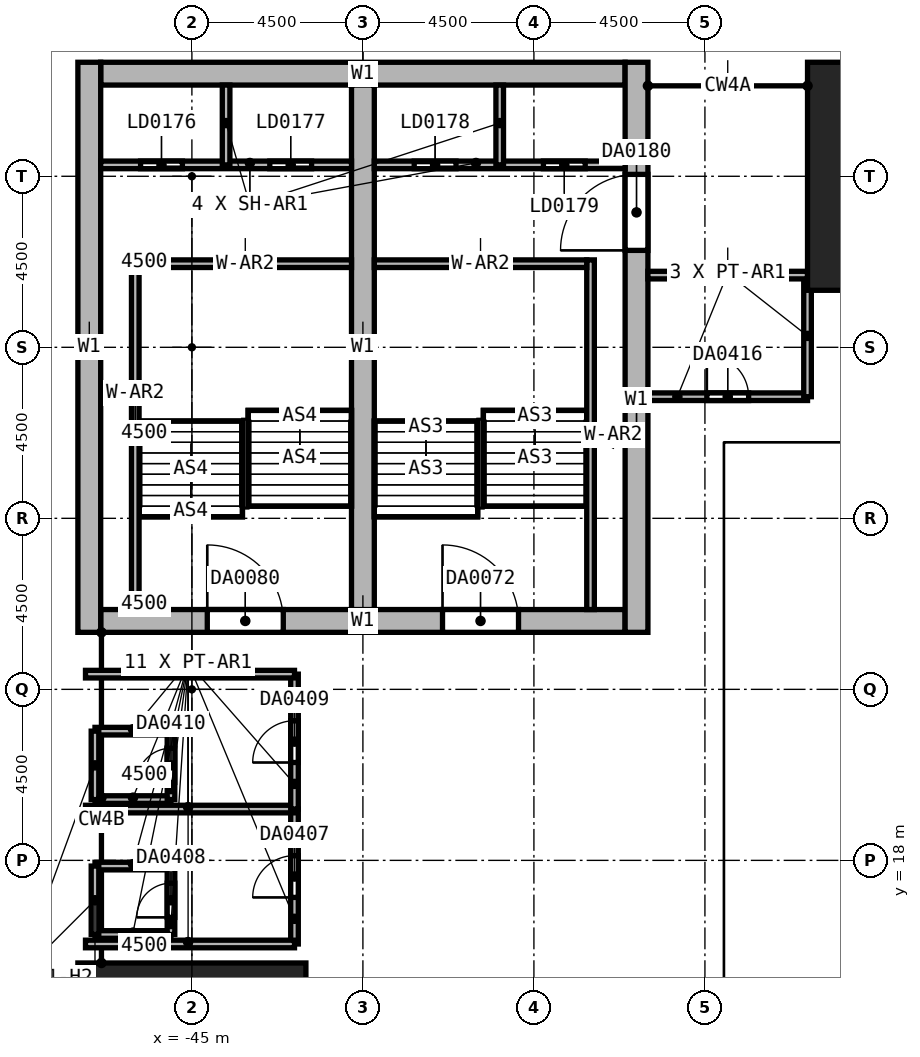
"""IFC4 building model, lengths in metres.
Left out: names, types, materials, properties, quantities, classifications, styles, units other than length and angle.
Written with IfcOpenShell. Run it as: python <this file> out.ifc"""

import sys

from ifc_helpers import new_model, si_unit, direction, frame, frame_2d, origin, origin_2d, place, context, subcontext, project, spatial, rectangle, extrude, element, fill, save


model = new_model("IFC4")
c1 = context("Model", 3, precision=1e-05, world=origin(), true_north=direction((0.0, 1.0)))
c2 = subcontext(c1, "Body", "Model", "MODEL_VIEW")
j1 = project(units=[si_unit("LENGTHUNIT", "METRE"), si_unit("PLANEANGLEUNIT", "RADIAN")], contexts=[c1])
p1 = place(None, origin())
s1 = spatial("IfcSite", under=j1, at=p1, CompositionType="ELEMENT")
p2 = place(p1, origin())
s2 = spatial("IfcBuilding", under=s1, at=p2, CompositionType="ELEMENT")
p3 = place(p2, frame((0.0, 0.0, 25.0)))
s3 = spatial("IfcBuildingStorey", under=s2, at=p3, CompositionType="ELEMENT", Elevation=25.0)
for number, where, z_axis, x_axis in (
    (1, (-27.0, 36.0, 0.0), (0.0, 0.0, 1.0), (1.0, 0.0, 0.0)),
    (2, (-45.0, 13.5, 0.0), (0.0, 0.0, 1.0), (0.0, 1.0, 0.0)),
):
    element("IfcColumn", number, at=place(p3, frame(where, z_axis=z_axis, x_axis=x_axis)), inside=s3, PredefinedType="COLUMN", context=c2, shape_type="SweptSolid", body=[
        extrude(rectangle(XDim=3.6, YDim=6.0, at=origin_2d()), origin(), (0.0, 0.0, 1.0), 6.0),
    ])
p4 = place(p3, frame((-47.4, 38.7, 0.0), z_axis=(0.0, 0.0, 1.0), x_axis=(1.0, 0.0, 0.0)))
e3 = element("IfcWall", 3, at=p4, inside=s3, PredefinedType="SHEAR", context=c2, shape_type="SweptSolid", body=[
    extrude(rectangle(XDim=13.8, YDim=0.6, at=frame_2d((6.9, 0.0))), origin(), (0.0, 0.0, 1.0), 6.0),
])
p5 = place(p3, frame((-47.4, 24.3, 0.0), z_axis=(0.0, 0.0, 1.0), x_axis=(1.0, 0.0, 0.0)))
e4 = element("IfcWall", 4, at=p5, inside=s3, PredefinedType="SHEAR", context=c2, shape_type="SweptSolid", body=[
    extrude(rectangle(XDim=13.8, YDim=0.6, at=frame_2d((6.9, 0.0))), origin(), (0.0, 0.0, 1.0), 6.0),
])
p6 = place(p5, frame((8.995, 0.0, 0.0)))
e5 = element("IfcOpeningElement", 5, at=p6, cuts=e4, PredefinedType="OPENING", context=c2, shape_type="SweptSolid", body=[
    extrude(rectangle(XDim=2.0, YDim=2.4, at=frame_2d((1.0, 1.2))), frame((0.0, 0.3, 0.0), z_axis=(0.0, -1.0, 0.0), x_axis=(1.0, 0.0, 0.0)), (0.0, 0.0, 1.0), 0.6),
])
p7 = place(p5, frame((2.805, 0.0, 0.0)))
e6 = element("IfcOpeningElement", 6, at=p7, cuts=e4, PredefinedType="OPENING", context=c2, shape_type="SweptSolid", body=[
    extrude(rectangle(XDim=2.0, YDim=2.4, at=frame_2d((1.0, 1.2))), frame((0.0, 0.3, 0.0), z_axis=(0.0, -1.0, 0.0), x_axis=(1.0, 0.0, 0.0)), (0.0, 0.0, 1.0), 0.6),
])
p8 = place(p3, frame((-47.7, 24.0, 0.0), z_axis=(0.0, 0.0, 1.0), x_axis=(0.0, 1.0, 0.0)))
e7 = element("IfcWall", 7, at=p8, inside=s3, PredefinedType="SHEAR", context=c2, shape_type="SweptSolid", body=[
    extrude(rectangle(XDim=15.0, YDim=0.6, at=frame_2d((7.5, 0.0))), origin(), (0.0, 0.0, 1.0), 6.0),
])
p9 = place(p3, frame((-33.3, 24.0, 0.0), z_axis=(0.0, 0.0, 1.0), x_axis=(0.0, 1.0, 0.0)))
e8 = element("IfcWall", 8, at=p9, inside=s3, PredefinedType="SHEAR", context=c2, shape_type="SweptSolid", body=[
    extrude(rectangle(XDim=15.0, YDim=0.6, at=frame_2d((7.5, 0.0))), origin(), (0.0, 0.0, 1.0), 6.0),
])
p10 = place(p9, frame((10.05, 0.0, 0.0)))
e9 = element("IfcOpeningElement", 9, at=p10, cuts=e8, PredefinedType="OPENING", context=c2, shape_type="SweptSolid", body=[
    extrude(rectangle(XDim=2.0, YDim=2.4, at=frame_2d((1.0, 1.2))), frame((0.0, 0.3, 0.0), z_axis=(0.0, -1.0, 0.0), x_axis=(1.0, 0.0, 0.0)), (0.0, 0.0, 1.0), 0.6),
])
p11 = place(p3, frame((-40.5, 24.6, 0.0), z_axis=(0.0, 0.0, 1.0), x_axis=(0.0, 1.0, 0.0)))
e10 = element("IfcWall", 10, at=p11, inside=s3, PredefinedType="SHEAR", context=c2, shape_type="SweptSolid", body=[
    extrude(rectangle(XDim=13.8, YDim=0.6, at=frame_2d((6.9, 0.0))), origin(), (0.0, 0.0, 1.0), 6.0),
])
p12 = place(p3, frame((-34.51, 24.6, 0.0), z_axis=(0.0, 0.0, 1.0), x_axis=(0.0, 1.0, 0.0)))
e11 = element("IfcWall", 11, at=p12, inside=s3, PredefinedType="SOLIDWALL", context=c2, shape_type="SweptSolid", body=[
    extrude(rectangle(XDim=9.2, YDim=0.2, at=frame_2d((4.6, 0.0))), origin(), (0.0, 0.0, 1.0), 6.0),
])
p13 = place(p3, frame((-40.2, 33.7, 0.0), z_axis=(0.0, 0.0, 1.0), x_axis=(1.0, 0.0, 0.0)))
e12 = element("IfcWall", 12, at=p13, inside=s3, PredefinedType="SOLIDWALL", context=c2, shape_type="SweptSolid", body=[
    extrude(rectangle(XDim=5.59, YDim=0.2, at=frame_2d((2.795, 0.0))), origin(), (0.0, 0.0, 1.0), 6.0),
])
p14 = place(p3, frame((-46.49, 24.6, 0.0), z_axis=(0.0, 0.0, 1.0), x_axis=(0.0, 1.0, 0.0)))
e13 = element("IfcWall", 13, at=p14, inside=s3, PredefinedType="SOLIDWALL", context=c2, shape_type="SweptSolid", body=[
    extrude(rectangle(XDim=9.2, YDim=0.2, at=frame_2d((4.6, 0.0))), origin(), (0.0, 0.0, 1.0), 6.0),
])
p15 = place(p3, frame((-46.39, 33.7, 0.0), z_axis=(0.0, 0.0, 1.0), x_axis=(1.0, 0.0, 0.0)))
e14 = element("IfcWall", 14, at=p15, inside=s3, PredefinedType="SOLIDWALL", context=c2, shape_type="SweptSolid", body=[
    extrude(rectangle(XDim=5.59, YDim=0.2, at=frame_2d((2.795, 0.0))), origin(), (0.0, 0.0, 1.0), 6.0),
])
p16 = place(p3, frame((-47.4, 36.3, 0.0), z_axis=(0.0, 0.0, 1.0), x_axis=(1.0, 0.0, 0.0)))
e15 = element("IfcWall", 15, at=p16, inside=s3, PredefinedType="SHEAR", context=c2, shape_type="SweptSolid", body=[
    extrude(rectangle(XDim=6.6, YDim=0.2, at=frame_2d((3.3, 0.0))), origin(), (0.0, 0.0, 1.0), 6.0),
])
p17 = place(p16, frame((1.05, 0.0, 0.0)))
e16 = element("IfcOpeningElement", 16, at=p17, cuts=e15, PredefinedType="OPENING", context=c2, shape_type="SweptSolid", body=[
    extrude(rectangle(XDim=1.1, YDim=2.4, at=frame_2d((0.55, 1.2))), frame((0.0, 0.1, 0.0), z_axis=(0.0, -1.0, 0.0), x_axis=(1.0, 0.0, 0.0)), (0.0, 0.0, 1.0), 0.2),
])
p18 = place(p16, frame((4.45, 0.0, 0.0)))
e17 = element("IfcOpeningElement", 17, at=p18, cuts=e15, PredefinedType="OPENING", context=c2, shape_type="SweptSolid", body=[
    extrude(rectangle(XDim=1.1, YDim=2.4, at=frame_2d((0.55, 1.2))), frame((0.0, 0.1, 0.0), z_axis=(0.0, -1.0, 0.0), x_axis=(1.0, 0.0, 0.0)), (0.0, 0.0, 1.0), 0.2),
])
p19 = place(p3, frame((-40.2, 36.3, 0.0), z_axis=(0.0, 0.0, 1.0), x_axis=(1.0, 0.0, 0.0)))
e18 = element("IfcWall", 18, at=p19, inside=s3, PredefinedType="SHEAR", context=c2, shape_type="SweptSolid", body=[
    extrude(rectangle(XDim=6.6, YDim=0.2, at=frame_2d((3.3, 0.0))), origin(), (0.0, 0.0, 1.0), 6.0),
])
p20 = place(p19, frame((1.05, 0.0, 0.0)))
e19 = element("IfcOpeningElement", 19, at=p20, cuts=e18, PredefinedType="OPENING", context=c2, shape_type="SweptSolid", body=[
    extrude(rectangle(XDim=1.1, YDim=2.4, at=frame_2d((0.55, 1.2))), frame((0.0, 0.1, 0.0), z_axis=(0.0, -1.0, 0.0), x_axis=(1.0, 0.0, 0.0)), (0.0, 0.0, 1.0), 0.2),
])
p21 = place(p19, frame((4.45, 0.0, 0.0)))
e20 = element("IfcOpeningElement", 20, at=p21, cuts=e18, PredefinedType="OPENING", context=c2, shape_type="SweptSolid", body=[
    extrude(rectangle(XDim=1.1, YDim=2.4, at=frame_2d((0.55, 1.2))), frame((0.0, 0.1, 0.0), z_axis=(0.0, -1.0, 0.0), x_axis=(1.0, 0.0, 0.0)), (0.0, 0.0, 1.0), 0.2),
])
for number, where, z_axis, x_axis in (
    (21, (-36.9, 36.3, 0.0), (0.0, 0.0, 1.0), (0.0, 1.0, 0.0)),
    (22, (-44.1, 36.3, 0.0), (0.0, 0.0, 1.0), (0.0, 1.0, 0.0)),
):
    element("IfcWall", number, at=place(p3, frame(where, z_axis=z_axis, x_axis=x_axis)), inside=s3, PredefinedType="SHEAR", context=c2, shape_type="SweptSolid", body=[
        extrude(rectangle(XDim=2.1, YDim=0.2, at=frame_2d((1.05, 0.0))), origin(), (0.0, 0.0, 1.0), 6.0),
    ])
p22 = place(p3, frame((-42.3, 15.8, 0.0), z_axis=(0.0, 0.0, 1.0), x_axis=(0.0, 1.0, 0.0)))
e23 = element("IfcWall", 23, at=p22, inside=s3, PredefinedType="PARTITIONING", context=c2, shape_type="SweptSolid", body=[
    extrude(rectangle(XDim=3.55, YDim=0.2, at=frame_2d((1.775, 0.0))), origin(), (0.0, 0.0, 1.0), 5.7),
])
p23 = place(p22, frame((1.225, 0.0, 0.0)))
e24 = element("IfcOpeningElement", 24, at=p23, cuts=e23, PredefinedType="OPENING", context=c2, shape_type="SweptSolid", body=[
    extrude(rectangle(XDim=1.1, YDim=2.4, at=frame_2d((0.55, 1.2))), frame((0.0, 0.1, 0.0), z_axis=(0.0, -1.0, 0.0), x_axis=(1.0, 0.0, 0.0)), (0.0, 0.0, 1.0), 0.2),
])
for number, where, z_axis, x_axis in (
    (25, (-42.3, 15.8, 0.0), (0.0, 0.0, 1.0), (-1.0, 0.0, 0.0)),
    (26, (-47.8, 19.35, 0.0), (0.0, 0.0, 1.0), (1.0, 0.0, 0.0)),
):
    element("IfcWall", number, at=place(p3, frame(where, z_axis=z_axis, x_axis=x_axis)), inside=s3, PredefinedType="PARTITIONING", context=c2, shape_type="SweptSolid", body=[
        extrude(rectangle(XDim=5.5, YDim=0.2, at=frame_2d((2.75, 0.0))), origin(), (0.0, 0.0, 1.0), 5.7),
    ])
for number, where, z_axis, x_axis in (
    (27, (-47.55, 16.05, 0.0), (0.0, 0.0, 1.0), (1.0, 0.0, 0.0)),
    (28, (-45.55, 17.85, 0.0), (0.0, 0.0, 1.0), (-1.0, 0.0, 0.0)),
):
    element("IfcWall", number, at=place(p3, frame(where, z_axis=z_axis, x_axis=x_axis)), inside=s3, PredefinedType="PARTITIONING", context=c2, shape_type="SweptSolid", body=[
        extrude(rectangle(XDim=2.0, YDim=0.2, at=frame_2d((1.0, 0.0))), origin(), (0.0, 0.0, 1.0), 5.7),
    ])
p24 = place(p3, frame((-47.55, 16.05, 0.0), z_axis=(0.0, 0.0, 1.0), x_axis=(0.0, 1.0, 0.0)))
e29 = element("IfcWall", 29, at=p24, inside=s3, PredefinedType="PARTITIONING", context=c2, shape_type="SweptSolid", body=[
    extrude(rectangle(XDim=1.8, YDim=0.2, at=frame_2d((0.9, 0.0))), origin(), (0.0, 0.0, 1.0), 4.5),
])
p25 = place(p3, frame((-45.55, 16.05, 0.0), z_axis=(0.0, 0.0, 1.0), x_axis=(0.0, 1.0, 0.0)))
e30 = element("IfcWall", 30, at=p25, inside=s3, PredefinedType="PARTITIONING", context=c2, shape_type="SweptSolid", body=[
    extrude(rectangle(XDim=1.8, YDim=0.2, at=frame_2d((0.9, 0.0))), origin(), (0.0, 0.0, 1.0), 5.7),
])
p26 = place(p25, frame((0.45, 0.0, 0.0)))
e31 = element("IfcOpeningElement", 31, at=p26, cuts=e30, PredefinedType="OPENING", context=c2, shape_type="SweptSolid", body=[
    extrude(rectangle(XDim=0.9, YDim=2.1, at=frame_2d((0.45, 1.05))), frame((0.0, 0.1, 0.0), z_axis=(0.0, -1.0, 0.0), x_axis=(1.0, 0.0, 0.0)), (0.0, 0.0, 1.0), 0.2),
])
p27 = place(p3, frame((-42.3, 19.35, 0.0), z_axis=(0.0, 0.0, 1.0), x_axis=(0.0, 1.0, 0.0)))
e32 = element("IfcWall", 32, at=p27, inside=s3, PredefinedType="PARTITIONING", context=c2, shape_type="SweptSolid", body=[
    extrude(rectangle(XDim=3.55, YDim=0.2, at=frame_2d((1.775, 0.0))), origin(), (0.0, 0.0, 1.0), 5.7),
])
p28 = place(p27, frame((1.225, 0.0, 0.0)))
e33 = element("IfcOpeningElement", 33, at=p28, cuts=e32, PredefinedType="OPENING", context=c2, shape_type="SweptSolid", body=[
    extrude(rectangle(XDim=1.1, YDim=2.4, at=frame_2d((0.55, 1.2))), frame((0.0, 0.1, 0.0), z_axis=(0.0, -1.0, 0.0), x_axis=(1.0, 0.0, 0.0)), (0.0, 0.0, 1.0), 0.2),
])
p29 = place(p3, frame((-42.3, 22.9, 0.0), z_axis=(0.0, 0.0, 1.0), x_axis=(-1.0, 0.0, 0.0)))
e34 = element("IfcWall", 34, at=p29, inside=s3, PredefinedType="PARTITIONING", context=c2, shape_type="SweptSolid", body=[
    extrude(rectangle(XDim=5.5, YDim=0.2, at=frame_2d((2.75, 0.0))), origin(), (0.0, 0.0, 1.0), 5.7),
])
for number, where, z_axis, x_axis in (
    (35, (-47.55, 19.6, 0.0), (0.0, 0.0, 1.0), (1.0, 0.0, 0.0)),
    (36, (-45.55, 21.4, 0.0), (0.0, 0.0, 1.0), (-1.0, 0.0, 0.0)),
):
    element("IfcWall", number, at=place(p3, frame(where, z_axis=z_axis, x_axis=x_axis)), inside=s3, PredefinedType="PARTITIONING", context=c2, shape_type="SweptSolid", body=[
        extrude(rectangle(XDim=2.0, YDim=0.2, at=frame_2d((1.0, 0.0))), origin(), (0.0, 0.0, 1.0), 5.7),
    ])
p30 = place(p3, frame((-47.55, 19.6, 0.0), z_axis=(0.0, 0.0, 1.0), x_axis=(0.0, 1.0, 0.0)))
e37 = element("IfcWall", 37, at=p30, inside=s3, PredefinedType="PARTITIONING", context=c2, shape_type="SweptSolid", body=[
    extrude(rectangle(XDim=1.8, YDim=0.2, at=frame_2d((0.9, 0.0))), origin(), (0.0, 0.0, 1.0), 4.5),
])
p31 = place(p3, frame((-45.55, 19.6, 0.0), z_axis=(0.0, 0.0, 1.0), x_axis=(0.0, 1.0, 0.0)))
e38 = element("IfcWall", 38, at=p31, inside=s3, PredefinedType="PARTITIONING", context=c2, shape_type="SweptSolid", body=[
    extrude(rectangle(XDim=1.8, YDim=0.2, at=frame_2d((0.9, 0.0))), origin(), (0.0, 0.0, 1.0), 5.7),
])
p32 = place(p31, frame((0.45, 0.0, 0.0)))
e39 = element("IfcOpeningElement", 39, at=p32, cuts=e38, PredefinedType="OPENING", context=c2, shape_type="SweptSolid", body=[
    extrude(rectangle(XDim=0.9, YDim=2.1, at=frame_2d((0.45, 1.05))), frame((0.0, 0.1, 0.0), z_axis=(0.0, -1.0, 0.0), x_axis=(1.0, 0.0, 0.0)), (0.0, 0.0, 1.0), 0.2),
])
p33 = place(p3, frame((-33.0, 30.2, 0.0), z_axis=(0.0, 0.0, 1.0), x_axis=(1.0, 0.0, 0.0)))
e40 = element("IfcWall", 40, at=p33, inside=s3, PredefinedType="PARTITIONING", context=c2, shape_type="SweptSolid", body=[
    extrude(rectangle(XDim=4.2, YDim=0.2, at=frame_2d((2.1, 0.0))), origin(), (0.0, 0.0, 1.0), 5.7),
])
p34 = place(p33, frame((1.55, 0.0, 0.0)))
e41 = element("IfcOpeningElement", 41, at=p34, cuts=e40, PredefinedType="OPENING", context=c2, shape_type="SweptSolid", body=[
    extrude(rectangle(XDim=1.1, YDim=2.4, at=frame_2d((0.55, 1.2))), frame((0.0, 0.1, 0.0), z_axis=(0.0, -1.0, 0.0), x_axis=(1.0, 0.0, 0.0)), (0.0, 0.0, 1.0), 0.2),
])
p35 = place(p3, frame((-28.8, 30.2, 0.0), z_axis=(0.0, 0.0, 1.0), x_axis=(0.0, 1.0, 0.0)))
e42 = element("IfcWall", 42, at=p35, inside=s3, PredefinedType="PARTITIONING", context=c2, shape_type="SweptSolid", body=[
    extrude(rectangle(XDim=3.2, YDim=0.2, at=frame_2d((1.6, 0.0))), origin(), (0.0, 0.0, 1.0), 5.7),
])
p36 = place(p3, frame((-33.0, 33.4, 0.0), z_axis=(0.0, 0.0, 1.0), x_axis=(1.0, 0.0, 0.0)))
e43 = element("IfcWall", 43, at=p36, inside=s3, PredefinedType="PARTITIONING", context=c2, shape_type="SweptSolid", body=[
    extrude(rectangle(XDim=4.2, YDim=0.2, at=frame_2d((2.1, 0.0))), origin(), (0.0, 0.0, 1.0), 5.7),
])
p37 = place(p6, origin())
e44 = element("IfcDoor", 44, at=p37, inside=s3, OperationType="DOUBLE_DOOR_SINGLE_SWING", PredefinedType="DOOR", context=c2, shape_type="SweptSolid", body=[
    extrude(rectangle(XDim=2.0, YDim=2.4, at=frame_2d((1.0, 1.2))), frame((0.0, 0.025, 0.0), z_axis=(0.0, -1.0, 0.0), x_axis=(1.0, 0.0, 0.0)), (0.0, 0.0, 1.0), 0.05),
])
fill(e5, e44)
p38 = place(p7, origin())
e45 = element("IfcDoor", 45, at=p38, inside=s3, OperationType="DOUBLE_DOOR_SINGLE_SWING", PredefinedType="DOOR", context=c2, shape_type="SweptSolid", body=[
    extrude(rectangle(XDim=2.0, YDim=2.4, at=frame_2d((1.0, 1.2))), frame((0.0, 0.025, 0.0), z_axis=(0.0, -1.0, 0.0), x_axis=(1.0, 0.0, 0.0)), (0.0, 0.0, 1.0), 0.05),
])
fill(e6, e45)
p39 = place(p17, origin())
e46 = element("IfcDoor", 46, at=p39, inside=s3, OperationType="DOUBLE_DOOR_SLIDING", PredefinedType="DOOR", context=c2, shape_type="SweptSolid", body=[
    extrude(rectangle(XDim=1.1, YDim=2.4, at=frame_2d((0.55, 1.2))), frame((0.0, 0.025, 0.0), z_axis=(0.0, -1.0, 0.0), x_axis=(1.0, 0.0, 0.0)), (0.0, 0.0, 1.0), 0.05),
])
fill(e16, e46)
p40 = place(p18, origin())
e47 = element("IfcDoor", 47, at=p40, inside=s3, OperationType="DOUBLE_DOOR_SLIDING", PredefinedType="DOOR", context=c2, shape_type="SweptSolid", body=[
    extrude(rectangle(XDim=1.1, YDim=2.4, at=frame_2d((0.55, 1.2))), frame((0.0, 0.025, 0.0), z_axis=(0.0, -1.0, 0.0), x_axis=(1.0, 0.0, 0.0)), (0.0, 0.0, 1.0), 0.05),
])
fill(e17, e47)
p41 = place(p20, origin())
e48 = element("IfcDoor", 48, at=p41, inside=s3, OperationType="DOUBLE_DOOR_SLIDING", PredefinedType="DOOR", context=c2, shape_type="SweptSolid", body=[
    extrude(rectangle(XDim=1.1, YDim=2.4, at=frame_2d((0.55, 1.2))), frame((0.0, 0.025, 0.0), z_axis=(0.0, -1.0, 0.0), x_axis=(1.0, 0.0, 0.0)), (0.0, 0.0, 1.0), 0.05),
])
fill(e19, e48)
p42 = place(p21, origin())
e49 = element("IfcDoor", 49, at=p42, inside=s3, OperationType="DOUBLE_DOOR_SLIDING", PredefinedType="DOOR", context=c2, shape_type="SweptSolid", body=[
    extrude(rectangle(XDim=1.1, YDim=2.4, at=frame_2d((0.55, 1.2))), frame((0.0, 0.025, 0.0), z_axis=(0.0, -1.0, 0.0), x_axis=(1.0, 0.0, 0.0)), (0.0, 0.0, 1.0), 0.05),
])
fill(e20, e49)
p43 = place(p10, origin())
e50 = element("IfcDoor", 50, at=p43, inside=s3, OperationType="DOUBLE_DOOR_SINGLE_SWING", PredefinedType="DOOR", context=c2, shape_type="SweptSolid", body=[
    extrude(rectangle(XDim=2.0, YDim=2.4, at=frame_2d((1.0, 1.2))), frame((0.0, 0.025, 0.0), z_axis=(0.0, -1.0, 0.0), x_axis=(1.0, 0.0, 0.0)), (0.0, 0.0, 1.0), 0.05),
])
fill(e9, e50)
p44 = place(p23, origin())
e51 = element("IfcDoor", 51, at=p44, inside=s3, OperationType="DOUBLE_DOOR_SINGLE_SWING", PredefinedType="DOOR", context=c2, shape_type="SweptSolid", body=[
    extrude(rectangle(XDim=1.1, YDim=2.4, at=frame_2d((0.55, 1.2))), frame((0.0, 0.025, 0.0), z_axis=(0.0, -1.0, 0.0), x_axis=(1.0, 0.0, 0.0)), (0.0, 0.0, 1.0), 0.05),
])
fill(e24, e51)
p45 = place(p26, origin())
e52 = element("IfcDoor", 52, at=p45, inside=s3, OperationType="SINGLE_SWING_LEFT", PredefinedType="DOOR", context=c2, shape_type="SweptSolid", body=[
    extrude(rectangle(XDim=0.9, YDim=2.1, at=frame_2d((0.45, 1.05))), frame((0.0, 0.025, 0.0), z_axis=(0.0, -1.0, 0.0), x_axis=(1.0, 0.0, 0.0)), (0.0, 0.0, 1.0), 0.05),
])
fill(e31, e52)
p46 = place(p28, origin())
e53 = element("IfcDoor", 53, at=p46, inside=s3, OperationType="DOUBLE_DOOR_SINGLE_SWING", PredefinedType="DOOR", context=c2, shape_type="SweptSolid", body=[
    extrude(rectangle(XDim=1.1, YDim=2.4, at=frame_2d((0.55, 1.2))), frame((0.0, 0.025, 0.0), z_axis=(0.0, -1.0, 0.0), x_axis=(1.0, 0.0, 0.0)), (0.0, 0.0, 1.0), 0.05),
])
fill(e33, e53)
p47 = place(p32, origin())
e54 = element("IfcDoor", 54, at=p47, inside=s3, OperationType="SINGLE_SWING_LEFT", PredefinedType="DOOR", context=c2, shape_type="SweptSolid", body=[
    extrude(rectangle(XDim=0.9, YDim=2.1, at=frame_2d((0.45, 1.05))), frame((0.0, 0.025, 0.0), z_axis=(0.0, -1.0, 0.0), x_axis=(1.0, 0.0, 0.0)), (0.0, 0.0, 1.0), 0.05),
])
fill(e39, e54)
p48 = place(p34, origin())
e55 = element("IfcDoor", 55, at=p48, inside=s3, OperationType="DOUBLE_DOOR_SINGLE_SWING", PredefinedType="DOOR", context=c2, shape_type="SweptSolid", body=[
    extrude(rectangle(XDim=1.1, YDim=2.4, at=frame_2d((0.55, 1.2))), frame((0.0, 0.025, 0.0), z_axis=(0.0, -1.0, 0.0), x_axis=(1.0, 0.0, 0.0)), (0.0, 0.0, 1.0), 0.05),
])
fill(e41, e55)
save(model, sys.argv[1])
